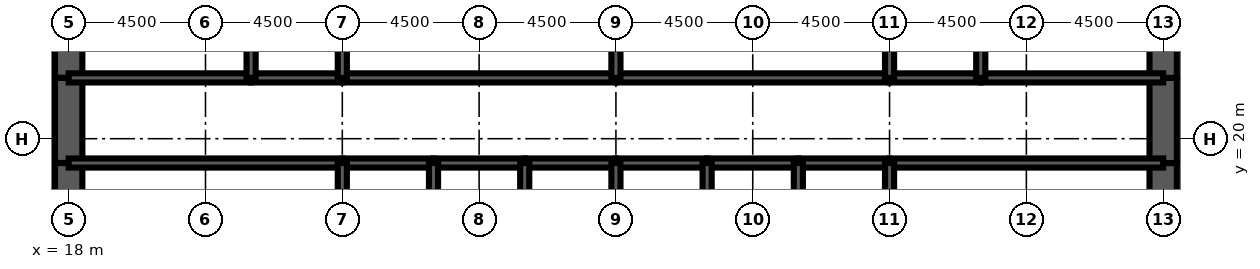
"""IFC4 building model, lengths in metres.
Left out: names, types, materials, properties, quantities, classifications, styles, units other than length and angle.
Written with IfcOpenShell. Run it as: python <this file> out.ifc"""

import sys

from ifc_helpers import new_model, si_unit, direction, frame, frame_2d, origin, place, context, subcontext, project, spatial, rectangle, extrude, element, fill, save


model = new_model("IFC4")
c1 = context("Model", 3, precision=1e-05, world=origin(), true_north=direction((0.0, 1.0)))
c2 = subcontext(c1, "Body", "Model", "MODEL_VIEW")
j1 = project(units=[si_unit("LENGTHUNIT", "METRE"), si_unit("PLANEANGLEUNIT", "RADIAN")], contexts=[c1])
p1 = place(None, origin())
s1 = spatial("IfcSite", under=j1, at=p1, CompositionType="ELEMENT")
p2 = place(p1, origin())
s2 = spatial("IfcBuilding", under=s1, at=p2, CompositionType="ELEMENT")
p3 = place(p2, frame((0.0, 0.0, 23.0)))
s3 = spatial("IfcBuildingStorey", under=s2, at=p3, CompositionType="ELEMENT", Elevation=23.0)
p4 = place(p3, frame((18.0, 26.0, 0.0), z_axis=(0.0, 0.0, 1.0), x_axis=(0.0, -1.0, 0.0)))
e1 = element("IfcWall", 1, at=p4, inside=s3, PredefinedType="SHEAR", context=c2, shape_type="SweptSolid", body=[
    extrude(rectangle(XDim=4.0, YDim=0.9, at=frame_2d((2.0, 0.0))), origin(), (0.0, 0.0, 1.0), 4.5),
])
p5 = place(p3, frame((18.0, 22.0, 0.0), z_axis=(0.0, 0.0, 1.0), x_axis=(0.0, -1.0, 0.0)))
e2 = element("IfcWall", 2, at=p5, inside=s3, PredefinedType="SHEAR", context=c2, shape_type="SweptSolid", body=[
    extrude(rectangle(XDim=2.8, YDim=0.9, at=frame_2d((1.4, 0.0))), origin(), (0.0, 0.0, 1.0), 4.5),
])
p6 = place(p5, frame((0.6, 0.0, 0.0)))
e3 = element("IfcOpeningElement", 3, at=p6, cuts=e2, PredefinedType="OPENING", context=c2, shape_type="SweptSolid", body=[
    extrude(rectangle(XDim=1.8, YDim=2.1, at=frame_2d((0.9, 1.05))), frame((0.0, 0.46, 0.0), z_axis=(0.0, -1.0, 0.0), x_axis=(1.0, 0.0, 0.0)), (0.0, 0.0, 1.0), 0.92),
])
for number, where, z_axis, x_axis in (
    (4, (18.0, 19.2, 0.0), (0.0, 0.0, 1.0), (0.0, -1.0, 0.0)),
    (5, (54.0, 16.0, 0.0), (0.0, 0.0, 1.0), (0.0, 1.0, 0.0)),
):
    element("IfcWall", number, at=place(p3, frame(where, z_axis=z_axis, x_axis=x_axis)), inside=s3, PredefinedType="SHEAR", context=c2, shape_type="SweptSolid", body=[
        extrude(rectangle(XDim=3.2, YDim=0.9, at=frame_2d((1.6, 0.0))), origin(), (0.0, 0.0, 1.0), 4.5),
    ])
p7 = place(p3, frame((54.0, 19.2, 0.0), z_axis=(0.0, 0.0, 1.0), x_axis=(0.0, 1.0, 0.0)))
e6 = element("IfcWall", 6, at=p7, inside=s3, PredefinedType="SHEAR", context=c2, shape_type="SweptSolid", body=[
    extrude(rectangle(XDim=2.8, YDim=0.9, at=frame_2d((1.4, 0.0))), origin(), (0.0, 0.0, 1.0), 4.5),
])
p8 = place(p7, frame((0.4, 0.0, 0.0)))
e7 = element("IfcOpeningElement", 7, at=p8, cuts=e6, PredefinedType="OPENING", context=c2, shape_type="SweptSolid", body=[
    extrude(rectangle(XDim=1.8, YDim=2.1, at=frame_2d((0.9, 1.05))), frame((0.0, 0.46, 0.0), z_axis=(0.0, -1.0, 0.0), x_axis=(1.0, 0.0, 0.0)), (0.0, 0.0, 1.0), 0.92),
])
p9 = place(p3, frame((54.0, 22.0, 0.0), z_axis=(0.0, 0.0, 1.0), x_axis=(0.0, 1.0, 0.0)))
e8 = element("IfcWall", 8, at=p9, inside=s3, PredefinedType="SHEAR", context=c2, shape_type="SweptSolid", body=[
    extrude(rectangle(XDim=4.0, YDim=0.9, at=frame_2d((2.0, 0.0))), origin(), (0.0, 0.0, 1.0), 4.5),
])
p10 = place(p3, frame((18.0, 19.2, 0.0), z_axis=(0.0, 0.0, 1.0), x_axis=(1.0, 0.0, 0.0)))
e9 = element("IfcWall", 9, at=p10, inside=s3, PredefinedType="SOLIDWALL", context=c2, shape_type="SweptSolid", body=[
    extrude(rectangle(XDim=9.0, YDim=0.3, at=frame_2d((4.5, 0.0))), origin(), (0.0, 0.0, 1.0), 4.5),
])
p11 = place(p10, frame((0.65, 0.0, 0.0)))
e10 = element("IfcOpeningElement", 10, at=p11, cuts=e9, PredefinedType="OPENING", context=c2, shape_type="SweptSolid", body=[
    extrude(rectangle(XDim=1.0, YDim=2.1, at=frame_2d((0.5, 1.05))), frame((0.0, 0.16, 0.0), z_axis=(0.0, -1.0, 0.0), x_axis=(1.0, 0.0, 0.0)), (0.0, 0.0, 1.0), 0.32),
])
p12 = place(p3, frame((27.0, 19.2, 0.0), z_axis=(0.0, 0.0, 1.0), x_axis=(1.0, 0.0, 0.0)))
e11 = element("IfcWall", 11, at=p12, inside=s3, PredefinedType="SOLIDWALL", context=c2, shape_type="SweptSolid", body=[
    extrude(rectangle(XDim=3.0, YDim=0.3, at=frame_2d((1.5, 0.0))), origin(), (0.0, 0.0, 1.0), 4.5),
])
p13 = place(p12, frame((0.95, 0.0, 0.0)))
e12 = element("IfcOpeningElement", 12, at=p13, cuts=e11, PredefinedType="OPENING", context=c2, shape_type="SweptSolid", body=[
    extrude(rectangle(XDim=1.1, YDim=2.2, at=frame_2d((0.55, 1.1))), frame((0.0, 0.16, 0.0), z_axis=(0.0, -1.0, 0.0), x_axis=(1.0, 0.0, 0.0)), (0.0, 0.0, 1.0), 0.32),
])
p14 = place(p3, frame((30.0, 19.2, 0.0), z_axis=(0.0, 0.0, 1.0), x_axis=(1.0, 0.0, 0.0)))
e13 = element("IfcWall", 13, at=p14, inside=s3, PredefinedType="SOLIDWALL", context=c2, shape_type="SweptSolid", body=[
    extrude(rectangle(XDim=3.0, YDim=0.3, at=frame_2d((1.5, 0.0))), origin(), (0.0, 0.0, 1.0), 4.5),
])
p15 = place(p14, frame((0.95, 0.0, 0.0)))
e14 = element("IfcOpeningElement", 14, at=p15, cuts=e13, PredefinedType="OPENING", context=c2, shape_type="SweptSolid", body=[
    extrude(rectangle(XDim=1.1, YDim=2.2, at=frame_2d((0.55, 1.1))), frame((0.0, 0.16, 0.0), z_axis=(0.0, -1.0, 0.0), x_axis=(1.0, 0.0, 0.0)), (0.0, 0.0, 1.0), 0.32),
])
p16 = place(p3, frame((33.0, 19.2, 0.0), z_axis=(0.0, 0.0, 1.0), x_axis=(1.0, 0.0, 0.0)))
e15 = element("IfcWall", 15, at=p16, inside=s3, PredefinedType="SOLIDWALL", context=c2, shape_type="SweptSolid", body=[
    extrude(rectangle(XDim=3.0, YDim=0.3, at=frame_2d((1.5, 0.0))), origin(), (0.0, 0.0, 1.0), 4.5),
])
p17 = place(p16, frame((0.95, 0.0, 0.0)))
e16 = element("IfcOpeningElement", 16, at=p17, cuts=e15, PredefinedType="OPENING", context=c2, shape_type="SweptSolid", body=[
    extrude(rectangle(XDim=1.1, YDim=2.2, at=frame_2d((0.55, 1.1))), frame((0.0, 0.16, 0.0), z_axis=(0.0, -1.0, 0.0), x_axis=(1.0, 0.0, 0.0)), (0.0, 0.0, 1.0), 0.32),
])
p18 = place(p3, frame((36.0, 19.2, 0.0), z_axis=(0.0, 0.0, 1.0), x_axis=(1.0, 0.0, 0.0)))
e17 = element("IfcWall", 17, at=p18, inside=s3, PredefinedType="SOLIDWALL", context=c2, shape_type="SweptSolid", body=[
    extrude(rectangle(XDim=3.0, YDim=0.3, at=frame_2d((1.5, 0.0))), origin(), (0.0, 0.0, 1.0), 4.5),
])
p19 = place(p18, frame((0.95, 0.0, 0.0)))
e18 = element("IfcOpeningElement", 18, at=p19, cuts=e17, PredefinedType="OPENING", context=c2, shape_type="SweptSolid", body=[
    extrude(rectangle(XDim=1.1, YDim=2.2, at=frame_2d((0.55, 1.1))), frame((0.0, 0.16, 0.0), z_axis=(0.0, -1.0, 0.0), x_axis=(1.0, 0.0, 0.0)), (0.0, 0.0, 1.0), 0.32),
])
for number, where, z_axis, x_axis in (
    (19, (39.0, 19.2, 0.0), (0.0, 0.0, 1.0), (1.0, 0.0, 0.0)),
    (20, (42.0, 19.2, 0.0), (0.0, 0.0, 1.0), (1.0, 0.0, 0.0)),
):
    element("IfcWall", number, at=place(p3, frame(where, z_axis=z_axis, x_axis=x_axis)), inside=s3, PredefinedType="SOLIDWALL", context=c2, shape_type="SweptSolid", body=[
        extrude(rectangle(XDim=3.0, YDim=0.3, at=frame_2d((1.5, 0.0))), origin(), (0.0, 0.0, 1.0), 4.5),
    ])
p20 = place(p3, frame((45.0, 19.2, 0.0), z_axis=(0.0, 0.0, 1.0), x_axis=(1.0, 0.0, 0.0)))
e21 = element("IfcWall", 21, at=p20, inside=s3, PredefinedType="SOLIDWALL", context=c2, shape_type="SweptSolid", body=[
    extrude(rectangle(XDim=9.0, YDim=0.3, at=frame_2d((4.5, 0.0))), origin(), (0.0, 0.0, 1.0), 4.5),
])
p21 = place(p20, frame((7.35, 0.0, 0.0)))
e22 = element("IfcOpeningElement", 22, at=p21, cuts=e21, PredefinedType="OPENING", context=c2, shape_type="SweptSolid", body=[
    extrude(rectangle(XDim=1.0, YDim=2.1, at=frame_2d((0.5, 1.05))), frame((0.0, 0.16, 0.0), z_axis=(0.0, -1.0, 0.0), x_axis=(1.0, 0.0, 0.0)), (0.0, 0.0, 1.0), 0.32),
])
p22 = place(p3, frame((18.0, 22.0, 0.0), z_axis=(0.0, 0.0, 1.0), x_axis=(1.0, 0.0, 0.0)))
e23 = element("IfcWall", 23, at=p22, inside=s3, PredefinedType="SOLIDWALL", context=c2, shape_type="SweptSolid", body=[
    extrude(rectangle(XDim=6.0, YDim=0.3, at=frame_2d((3.0, 0.0))), origin(), (0.0, 0.0, 1.0), 4.5),
])
p23 = place(p22, frame((4.4, 0.0, 0.0)))
e24 = element("IfcOpeningElement", 24, at=p23, cuts=e23, PredefinedType="OPENING", context=c2, shape_type="SweptSolid", body=[
    extrude(rectangle(XDim=1.0, YDim=2.1, at=frame_2d((0.5, 1.05))), frame((0.0, 0.16, 0.0), z_axis=(0.0, -1.0, 0.0), x_axis=(1.0, 0.0, 0.0)), (0.0, 0.0, 1.0), 0.32),
])
p24 = place(p22, frame((0.7, 0.0, 0.0)))
e25 = element("IfcOpeningElement", 25, at=p24, cuts=e23, PredefinedType="OPENING", context=c2, shape_type="SweptSolid", body=[
    extrude(rectangle(XDim=1.0, YDim=2.1, at=frame_2d((0.5, 1.05))), frame((0.0, 0.16, 0.0), z_axis=(0.0, -1.0, 0.0), x_axis=(1.0, 0.0, 0.0)), (0.0, 0.0, 1.0), 0.32),
])
p25 = place(p3, frame((24.0, 22.0, 0.0), z_axis=(0.0, 0.0, 1.0), x_axis=(1.0, 0.0, 0.0)))
e26 = element("IfcWall", 26, at=p25, inside=s3, PredefinedType="SOLIDWALL", context=c2, shape_type="SweptSolid", body=[
    extrude(rectangle(XDim=3.0, YDim=0.3, at=frame_2d((1.5, 0.0))), origin(), (0.0, 0.0, 1.0), 4.5),
])
p26 = place(p25, frame((1.0, 0.0, 0.0)))
e27 = element("IfcOpeningElement", 27, at=p26, cuts=e26, PredefinedType="OPENING", context=c2, shape_type="SweptSolid", body=[
    extrude(rectangle(XDim=1.0, YDim=2.1, at=frame_2d((0.5, 1.05))), frame((0.0, 0.16, 0.0), z_axis=(0.0, -1.0, 0.0), x_axis=(1.0, 0.0, 0.0)), (0.0, 0.0, 1.0), 0.32),
])
p27 = place(p3, frame((27.0, 22.0, 0.0), z_axis=(0.0, 0.0, 1.0), x_axis=(1.0, 0.0, 0.0)))
e28 = element("IfcWall", 28, at=p27, inside=s3, PredefinedType="SOLIDWALL", context=c2, shape_type="SweptSolid", body=[
    extrude(rectangle(XDim=9.0, YDim=0.3, at=frame_2d((4.5, 0.0))), origin(), (0.0, 0.0, 1.0), 4.5),
])
p28 = place(p27, frame((4.0, 0.0, 0.0)))
e29 = element("IfcOpeningElement", 29, at=p28, cuts=e28, PredefinedType="OPENING", context=c2, shape_type="SweptSolid", body=[
    extrude(rectangle(XDim=1.0, YDim=2.1, at=frame_2d((0.5, 1.05))), frame((0.0, 0.16, 0.0), z_axis=(0.0, -1.0, 0.0), x_axis=(1.0, 0.0, 0.0)), (0.0, 0.0, 1.0), 0.32),
])
p29 = place(p3, frame((36.0, 22.0, 0.0), z_axis=(0.0, 0.0, 1.0), x_axis=(1.0, 0.0, 0.0)))
e30 = element("IfcWall", 30, at=p29, inside=s3, PredefinedType="SOLIDWALL", context=c2, shape_type="SweptSolid", body=[
    extrude(rectangle(XDim=9.0, YDim=0.3, at=frame_2d((4.5, 0.0))), origin(), (0.0, 0.0, 1.0), 4.5),
])
p30 = place(p29, frame((4.0, 0.0, 0.0)))
e31 = element("IfcOpeningElement", 31, at=p30, cuts=e30, PredefinedType="OPENING", context=c2, shape_type="SweptSolid", body=[
    extrude(rectangle(XDim=1.0, YDim=2.1, at=frame_2d((0.5, 1.05))), frame((0.0, 0.16, 0.0), z_axis=(0.0, -1.0, 0.0), x_axis=(1.0, 0.0, 0.0)), (0.0, 0.0, 1.0), 0.32),
])
p31 = place(p3, frame((45.0, 22.0, 0.0), z_axis=(0.0, 0.0, 1.0), x_axis=(1.0, 0.0, 0.0)))
e32 = element("IfcWall", 32, at=p31, inside=s3, PredefinedType="SOLIDWALL", context=c2, shape_type="SweptSolid", body=[
    extrude(rectangle(XDim=3.0, YDim=0.3, at=frame_2d((1.5, 0.0))), origin(), (0.0, 0.0, 1.0), 4.5),
])
p32 = place(p31, frame((1.0, 0.0, 0.0)))
e33 = element("IfcOpeningElement", 33, at=p32, cuts=e32, PredefinedType="OPENING", context=c2, shape_type="SweptSolid", body=[
    extrude(rectangle(XDim=1.0, YDim=2.1, at=frame_2d((0.5, 1.05))), frame((0.0, 0.16, 0.0), z_axis=(0.0, -1.0, 0.0), x_axis=(1.0, 0.0, 0.0)), (0.0, 0.0, 1.0), 0.32),
])
p33 = place(p3, frame((48.0, 22.0, 0.0), z_axis=(0.0, 0.0, 1.0), x_axis=(1.0, 0.0, 0.0)))
e34 = element("IfcWall", 34, at=p33, inside=s3, PredefinedType="SOLIDWALL", context=c2, shape_type="SweptSolid", body=[
    extrude(rectangle(XDim=6.0, YDim=0.3, at=frame_2d((3.0, 0.0))), origin(), (0.0, 0.0, 1.0), 4.5),
])
p34 = place(p33, frame((2.0, 0.0, 0.0)))
e35 = element("IfcOpeningElement", 35, at=p34, cuts=e34, PredefinedType="OPENING", context=c2, shape_type="SweptSolid", body=[
    extrude(rectangle(XDim=1.0, YDim=2.1, at=frame_2d((0.5, 1.05))), frame((0.0, 0.16, 0.0), z_axis=(0.0, -1.0, 0.0), x_axis=(1.0, 0.0, 0.0)), (0.0, 0.0, 1.0), 0.32),
])
p35 = place(p33, frame((4.0, 0.0, 0.0)))
e36 = element("IfcOpeningElement", 36, at=p35, cuts=e34, PredefinedType="OPENING", context=c2, shape_type="SweptSolid", body=[
    extrude(rectangle(XDim=1.0, YDim=2.1, at=frame_2d((0.5, 1.05))), frame((0.0, 0.16, 0.0), z_axis=(0.0, -1.0, 0.0), x_axis=(1.0, 0.0, 0.0)), (0.0, 0.0, 1.0), 0.32),
])
for number, where, z_axis, x_axis in (
    (37, (27.0, 16.0, 0.0), (0.0, 0.0, 1.0), (0.0, 1.0, 0.0)),
    (38, (30.0, 16.0, 0.0), (0.0, 0.0, 1.0), (0.0, 1.0, 0.0)),
    (39, (33.0, 16.0, 0.0), (0.0, 0.0, 1.0), (0.0, 1.0, 0.0)),
    (40, (36.0, 16.0, 0.0), (0.0, 0.0, 1.0), (0.0, 1.0, 0.0)),
    (41, (39.0, 16.0, 0.0), (0.0, 0.0, 1.0), (0.0, 1.0, 0.0)),
    (42, (42.0, 16.0, 0.0), (0.0, 0.0, 1.0), (0.0, 1.0, 0.0)),
    (43, (45.0, 16.0, 0.0), (0.0, 0.0, 1.0), (0.0, 1.0, 0.0)),
):
    element("IfcWall", number, at=place(p3, frame(where, z_axis=z_axis, x_axis=x_axis)), inside=s3, PredefinedType="SOLIDWALL", context=c2, shape_type="SweptSolid", body=[
        extrude(rectangle(XDim=3.2, YDim=0.3, at=frame_2d((1.6, 0.0))), origin(), (0.0, 0.0, 1.0), 4.5),
    ])
for number, where, z_axis, x_axis in (
    (44, (24.0, 22.0, 0.0), (0.0, 0.0, 1.0), (0.0, 1.0, 0.0)),
    (45, (27.0, 22.0, 0.0), (0.0, 0.0, 1.0), (0.0, 1.0, 0.0)),
    (46, (36.0, 22.0, 0.0), (0.0, 0.0, 1.0), (0.0, 1.0, 0.0)),
    (47, (45.0, 22.0, 0.0), (0.0, 0.0, 1.0), (0.0, 1.0, 0.0)),
    (48, (48.0, 22.0, 0.0), (0.0, 0.0, 1.0), (0.0, 1.0, 0.0)),
):
    element("IfcWall", number, at=place(p3, frame(where, z_axis=z_axis, x_axis=x_axis)), inside=s3, PredefinedType="SOLIDWALL", context=c2, shape_type="SweptSolid", body=[
        extrude(rectangle(XDim=4.0, YDim=0.3, at=frame_2d((2.0, 0.0))), origin(), (0.0, 0.0, 1.0), 4.5),
    ])
p36 = place(p3, frame((38.0, 22.15, 0.0), z_axis=(0.0, 0.0, 1.0), x_axis=(0.0, 1.0, 0.0)))
e49 = element("IfcWall", 49, at=p36, inside=s3, PredefinedType="PARTITIONING", context=c2, shape_type="SweptSolid", body=[
    extrude(rectangle(XDim=3.7, YDim=0.15, at=frame_2d((1.85, 0.0))), origin(), (0.0, 0.0, 1.0), 3.0),
])
p37 = place(p36, frame((2.2, 0.0, 0.0)))
e50 = element("IfcOpeningElement", 50, at=p37, cuts=e49, PredefinedType="OPENING", context=c2, shape_type="SweptSolid", body=[
    extrude(rectangle(XDim=1.0, YDim=2.1, at=frame_2d((0.5, 1.05))), frame((0.0, 0.085, 0.0), z_axis=(0.0, -1.0, 0.0), x_axis=(1.0, 0.0, 0.0)), (0.0, 0.0, 1.0), 0.17),
])
for number, where, z_axis, x_axis in (
    (51, (20.025, 22.15, 0.0), (0.0, 0.0, 1.0), (0.0, 1.0, 0.0)),
    (52, (51.375, 22.15, 0.0), (0.0, 0.0, 1.0), (0.0, 1.0, 0.0)),
):
    element("IfcWall", number, at=place(p3, frame(where, z_axis=z_axis, x_axis=x_axis)), inside=s3, PredefinedType="PARTITIONING", context=c2, shape_type="SweptSolid", body=[
        extrude(rectangle(XDim=3.7, YDim=0.15, at=frame_2d((1.85, 0.0))), origin(), (0.0, 0.0, 1.0), 3.0),
    ])
p38 = place(p13, origin())
e53 = element("IfcDoor", 53, at=p38, inside=s3, OperationType="DOUBLE_DOOR_SLIDING", PredefinedType="USERDEFINED", context=c2, shape_type="SweptSolid", body=[
    extrude(rectangle(XDim=1.1, YDim=2.2, at=frame_2d((0.55, 1.1))), frame((0.0, 0.025, 0.0), z_axis=(0.0, -1.0, 0.0), x_axis=(1.0, 0.0, 0.0)), (0.0, 0.0, 1.0), 0.05),
])
fill(e12, e53)
p39 = place(p15, origin())
e54 = element("IfcDoor", 54, at=p39, inside=s3, OperationType="DOUBLE_DOOR_SLIDING", PredefinedType="USERDEFINED", context=c2, shape_type="SweptSolid", body=[
    extrude(rectangle(XDim=1.1, YDim=2.2, at=frame_2d((0.55, 1.1))), frame((0.0, 0.025, 0.0), z_axis=(0.0, -1.0, 0.0), x_axis=(1.0, 0.0, 0.0)), (0.0, 0.0, 1.0), 0.05),
])
fill(e14, e54)
p40 = place(p17, origin())
e55 = element("IfcDoor", 55, at=p40, inside=s3, OperationType="DOUBLE_DOOR_SLIDING", PredefinedType="USERDEFINED", context=c2, shape_type="SweptSolid", body=[
    extrude(rectangle(XDim=1.1, YDim=2.2, at=frame_2d((0.55, 1.1))), frame((0.0, 0.025, 0.0), z_axis=(0.0, -1.0, 0.0), x_axis=(1.0, 0.0, 0.0)), (0.0, 0.0, 1.0), 0.05),
])
fill(e16, e55)
p41 = place(p19, origin())
e56 = element("IfcDoor", 56, at=p41, inside=s3, OperationType="DOUBLE_DOOR_SLIDING", PredefinedType="USERDEFINED", context=c2, shape_type="SweptSolid", body=[
    extrude(rectangle(XDim=1.1, YDim=2.2, at=frame_2d((0.55, 1.1))), frame((0.0, 0.025, 0.0), z_axis=(0.0, -1.0, 0.0), x_axis=(1.0, 0.0, 0.0)), (0.0, 0.0, 1.0), 0.05),
])
fill(e18, e56)
p42 = place(p11, origin())
e57 = element("IfcDoor", 57, at=p42, inside=s3, OperationType="SINGLE_SWING_LEFT", PredefinedType="DOOR", context=c2, shape_type="SweptSolid", body=[
    extrude(rectangle(XDim=1.0, YDim=2.1, at=frame_2d((0.5, 1.05))), frame((0.0, 0.025, 0.0), z_axis=(0.0, -1.0, 0.0), x_axis=(1.0, 0.0, 0.0)), (0.0, 0.0, 1.0), 0.05),
])
fill(e10, e57)
p43 = place(p21, origin())
e58 = element("IfcDoor", 58, at=p43, inside=s3, OperationType="SINGLE_SWING_RIGHT", PredefinedType="DOOR", context=c2, shape_type="SweptSolid", body=[
    extrude(rectangle(XDim=1.0, YDim=2.1, at=frame_2d((0.5, 1.05))), frame((0.0, 0.025, 0.0), z_axis=(0.0, -1.0, 0.0), x_axis=(1.0, 0.0, 0.0)), (0.0, 0.0, 1.0), 0.05),
])
fill(e22, e58)
p44 = place(p6, origin())
e59 = element("IfcDoor", 59, at=p44, inside=s3, OperationType="SINGLE_SWING_LEFT", PredefinedType="DOOR", context=c2, shape_type="SweptSolid", body=[
    extrude(rectangle(XDim=1.8, YDim=2.1, at=frame_2d((0.9, 1.05))), frame((0.0, 0.45, 0.0), z_axis=(0.0, -1.0, 0.0), x_axis=(1.0, 0.0, 0.0)), (0.0, 0.0, 1.0), 0.899),
])
fill(e3, e59)
p45 = place(p8, origin())
e60 = element("IfcDoor", 60, at=p45, inside=s3, OperationType="SINGLE_SWING_LEFT", PredefinedType="DOOR", context=c2, shape_type="SweptSolid", body=[
    extrude(rectangle(XDim=1.8, YDim=2.1, at=frame_2d((0.9, 1.05))), frame((0.0, 0.45, 0.0), z_axis=(0.0, -1.0, 0.0), x_axis=(1.0, 0.0, 0.0)), (0.0, 0.0, 1.0), 0.899),
])
fill(e7, e60)
p46 = place(p23, origin())
e61 = element("IfcDoor", 61, at=p46, inside=s3, OperationType="SINGLE_SWING_RIGHT", PredefinedType="DOOR", context=c2, shape_type="SweptSolid", body=[
    extrude(rectangle(XDim=1.0, YDim=2.1, at=frame_2d((0.5, 1.05))), frame((0.0, 0.025, 0.0), z_axis=(0.0, -1.0, 0.0), x_axis=(1.0, 0.0, 0.0)), (0.0, 0.0, 1.0), 0.05),
])
fill(e24, e61)
p47 = place(p26, origin())
e62 = element("IfcDoor", 62, at=p47, inside=s3, OperationType="SINGLE_SWING_LEFT", PredefinedType="DOOR", context=c2, shape_type="SweptSolid", body=[
    extrude(rectangle(XDim=1.0, YDim=2.1, at=frame_2d((0.5, 1.05))), frame((0.0, 0.025, 0.0), z_axis=(0.0, -1.0, 0.0), x_axis=(1.0, 0.0, 0.0)), (0.0, 0.0, 1.0), 0.05),
])
fill(e27, e62)
p48 = place(p28, origin())
e63 = element("IfcDoor", 63, at=p48, inside=s3, OperationType="SINGLE_SWING_LEFT", PredefinedType="DOOR", context=c2, shape_type="SweptSolid", body=[
    extrude(rectangle(XDim=1.0, YDim=2.1, at=frame_2d((0.5, 1.05))), frame((0.0, 0.025, 0.0), z_axis=(0.0, -1.0, 0.0), x_axis=(1.0, 0.0, 0.0)), (0.0, 0.0, 1.0), 0.05),
])
fill(e29, e63)
p49 = place(p30, origin())
e64 = element("IfcDoor", 64, at=p49, inside=s3, OperationType="SINGLE_SWING_LEFT", PredefinedType="DOOR", context=c2, shape_type="SweptSolid", body=[
    extrude(rectangle(XDim=1.0, YDim=2.1, at=frame_2d((0.5, 1.05))), frame((0.0, 0.025, 0.0), z_axis=(0.0, -1.0, 0.0), x_axis=(1.0, 0.0, 0.0)), (0.0, 0.0, 1.0), 0.05),
])
fill(e31, e64)
p50 = place(p32, origin())
e65 = element("IfcDoor", 65, at=p50, inside=s3, OperationType="SINGLE_SWING_LEFT", PredefinedType="DOOR", context=c2, shape_type="SweptSolid", body=[
    extrude(rectangle(XDim=1.0, YDim=2.1, at=frame_2d((0.5, 1.05))), frame((0.0, 0.025, 0.0), z_axis=(0.0, -1.0, 0.0), x_axis=(1.0, 0.0, 0.0)), (0.0, 0.0, 1.0), 0.05),
])
fill(e33, e65)
p51 = place(p34, origin())
e66 = element("IfcDoor", 66, at=p51, inside=s3, OperationType="SINGLE_SWING_LEFT", PredefinedType="DOOR", context=c2, shape_type="SweptSolid", body=[
    extrude(rectangle(XDim=1.0, YDim=2.1, at=frame_2d((0.5, 1.05))), frame((0.0, 0.025, 0.0), z_axis=(0.0, -1.0, 0.0), x_axis=(1.0, 0.0, 0.0)), (0.0, 0.0, 1.0), 0.05),
])
fill(e35, e66)
p52 = place(p24, origin())
e67 = element("IfcDoor", 67, at=p52, inside=s3, OperationType="SINGLE_SWING_LEFT", PredefinedType="DOOR", context=c2, shape_type="SweptSolid", body=[
    extrude(rectangle(XDim=1.0, YDim=2.1, at=frame_2d((0.5, 1.05))), frame((0.0, 0.025, 0.0), z_axis=(0.0, -1.0, 0.0), x_axis=(1.0, 0.0, 0.0)), (0.0, 0.0, 1.0), 0.05),
])
fill(e25, e67)
p53 = place(p35, origin())
e68 = element("IfcDoor", 68, at=p53, inside=s3, OperationType="SINGLE_SWING_RIGHT", PredefinedType="DOOR", context=c2, shape_type="SweptSolid", body=[
    extrude(rectangle(XDim=1.0, YDim=2.1, at=frame_2d((0.5, 1.05))), frame((0.0, 0.025, 0.0), z_axis=(0.0, -1.0, 0.0), x_axis=(1.0, 0.0, 0.0)), (0.0, 0.0, 1.0), 0.05),
])
fill(e36, e68)
save(model, sys.argv[1])
